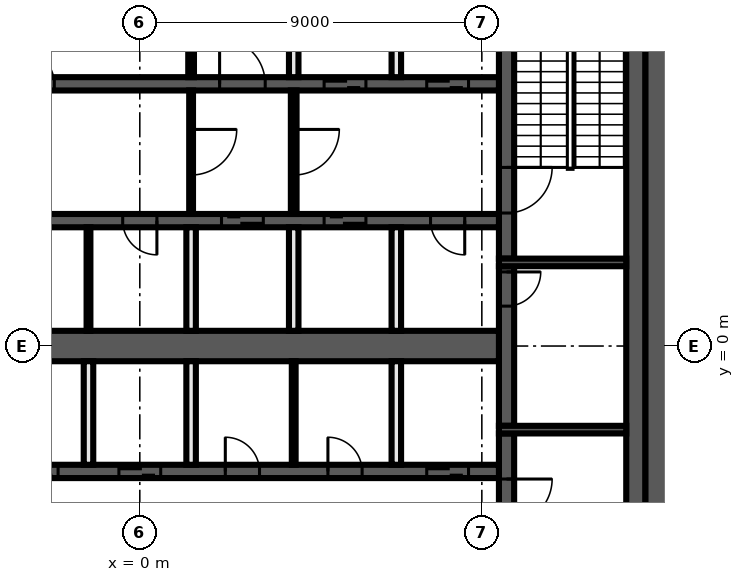
"""IFC4 building model, lengths in metres.
Left out: names, types, materials, properties, quantities, classifications, styles, units other than length and angle.
Written with IfcOpenShell. Run it as: python <this file> out.ifc"""

import sys

from ifc_helpers import new_model, si_unit, direction, frame, frame_2d, origin, place, context, subcontext, project, spatial, rectangle, extrude, element, fill, save


model = new_model("IFC4")
c1 = context("Model", 3, precision=1e-05, world=origin(), true_north=direction((0.0, 1.0)))
c2 = subcontext(c1, "Body", "Model", "MODEL_VIEW")
j1 = project(units=[si_unit("LENGTHUNIT", "METRE"), si_unit("PLANEANGLEUNIT", "RADIAN")], contexts=[c1])
p1 = place(None, origin())
s1 = spatial("IfcSite", under=j1, at=p1, CompositionType="ELEMENT")
p2 = place(p1, origin())
s2 = spatial("IfcBuilding", under=s1, at=p2, CompositionType="ELEMENT")
p3 = place(p2, frame((0.0, 0.0, 258.0)))
s3 = spatial("IfcBuildingStorey", under=s2, at=p3, CompositionType="ELEMENT", Elevation=258.0)
p4 = place(p3, frame((13.65, 10.3, 0.0), z_axis=(0.0, 0.0, 1.0), x_axis=(0.0, -1.0, 0.0)))
e1 = element("IfcWall", 1, at=p4, inside=s3, PredefinedType="SHEAR", context=c2, shape_type="SweptSolid", body=[
    extrude(rectangle(XDim=20.6, YDim=0.7, at=frame_2d((10.3, 0.0))), origin(), (0.0, 0.0, 1.0), 3.82),
])
p5 = place(p3, frame((13.05, 9.8, 0.0), z_axis=(0.0, 0.0, 1.0), x_axis=(0.0, -1.0, 0.0)))
e2 = element("IfcWall", 2, at=p5, inside=s3, PredefinedType="SHEAR", context=c2, shape_type="SweptSolid", body=[
    extrude(rectangle(XDim=19.6, YDim=0.5, at=frame_2d((9.8, 0.0))), origin(), (0.0, 0.0, 1.0), 3.82),
])
p6 = place(p3, frame((9.65, -2.3, 0.0), z_axis=(0.0, 0.0, 1.0), x_axis=(0.0, -1.0, 0.0)))
e3 = element("IfcWall", 3, at=p6, inside=s3, PredefinedType="SHEAR", context=c2, shape_type="SweptSolid", body=[
    extrude(rectangle(XDim=7.5, YDim=0.4, at=frame_2d((3.75, 0.0))), origin(), (0.0, 0.0, 1.0), 3.82),
])
p7 = place(p6, frame((1.2, 0.0, 0.0)))
e4 = element("IfcOpeningElement", 4, at=p7, cuts=e3, PredefinedType="OPENING", context=c2, shape_type="SweptSolid", body=[
    extrude(rectangle(XDim=1.2, YDim=2.1, at=frame_2d((0.6, 1.05))), frame((0.0, 0.21, 0.0), z_axis=(0.0, -1.0, 0.0), x_axis=(1.0, 0.0, 0.0)), (0.0, 0.0, 1.0), 0.42),
])
p8 = place(p3, frame((9.65, 2.1, 0.0), z_axis=(0.0, 0.0, 1.0), x_axis=(0.0, -1.0, 0.0)))
e5 = element("IfcWall", 5, at=p8, inside=s3, PredefinedType="SHEAR", context=c2, shape_type="SweptSolid", body=[
    extrude(rectangle(XDim=4.2, YDim=0.4, at=frame_2d((2.1, 0.0))), origin(), (0.0, 0.0, 1.0), 3.82),
])
p9 = place(p8, frame((0.15, 0.0, 0.0)))
e6 = element("IfcOpeningElement", 6, at=p9, cuts=e5, PredefinedType="OPENING", context=c2, shape_type="SweptSolid", body=[
    extrude(rectangle(XDim=0.9, YDim=2.1, at=frame_2d((0.45, 1.05))), frame((0.0, 0.21, 0.0), z_axis=(0.0, -1.0, 0.0), x_axis=(1.0, 0.0, 0.0)), (0.0, 0.0, 1.0), 0.42),
])
p10 = place(p3, frame((9.65, 9.8, 0.0), z_axis=(0.0, 0.0, 1.0), x_axis=(0.0, -1.0, 0.0)))
e7 = element("IfcWall", 7, at=p10, inside=s3, PredefinedType="SHEAR", context=c2, shape_type="SweptSolid", body=[
    extrude(rectangle(XDim=7.5, YDim=0.4, at=frame_2d((3.75, 0.0))), origin(), (0.0, 0.0, 1.0), 3.82),
])
p11 = place(p10, frame((5.1, 0.0, 0.0)))
e8 = element("IfcOpeningElement", 8, at=p11, cuts=e7, PredefinedType="OPENING", context=c2, shape_type="SweptSolid", body=[
    extrude(rectangle(XDim=1.2, YDim=2.1, at=frame_2d((0.6, 1.05))), frame((0.0, 0.21, 0.0), z_axis=(0.0, -1.0, 0.0), x_axis=(1.0, 0.0, 0.0)), (0.0, 0.0, 1.0), 0.42),
])
for number, where, z_axis, x_axis in (
    (9, (9.45, 2.2, 0.0), (0.0, 0.0, 1.0), (1.0, 0.0, 0.0)),
    (10, (9.45, -2.2, 0.0), (0.0, 0.0, 1.0), (1.0, 0.0, 0.0)),
):
    element("IfcWall", number, at=place(p3, frame(where, z_axis=z_axis, x_axis=x_axis)), inside=s3, PredefinedType="SHEAR", context=c2, shape_type="SweptSolid", body=[
        extrude(rectangle(XDim=3.35, YDim=0.2, at=frame_2d((1.675, 0.0))), origin(), (0.0, 0.0, 1.0), 3.82),
    ])
p12 = place(p3, frame((-9.45, 6.9, 0.0), z_axis=(0.0, 0.0, 1.0), x_axis=(1.0, 0.0, 0.0)))
e11 = element("IfcWall", 11, at=p12, inside=s3, PredefinedType="SHEAR", context=c2, shape_type="SweptSolid", body=[
    extrude(rectangle(XDim=18.9, YDim=0.35, at=frame_2d((9.45, 0.0))), origin(), (0.0, 0.0, 1.0), 3.82),
])
p13 = place(p12, frame((11.55, 0.0, 0.0)))
e12 = element("IfcOpeningElement", 12, at=p13, cuts=e11, PredefinedType="OPENING", context=c2, shape_type="SweptSolid", body=[
    extrude(rectangle(XDim=1.2, YDim=2.1, at=frame_2d((0.6, 1.05))), frame((0.0, 0.185, 0.0), z_axis=(0.0, -1.0, 0.0), x_axis=(1.0, 0.0, 0.0)), (0.0, 0.0, 1.0), 0.37),
])
p14 = place(p12, frame((14.3, 0.0, 0.0)))
e13 = element("IfcOpeningElement", 13, at=p14, cuts=e11, PredefinedType="OPENING", context=c2, shape_type="SweptSolid", body=[
    extrude(rectangle(XDim=1.1, YDim=2.1, at=frame_2d((0.55, 1.05))), frame((0.0, 0.185, 0.0), z_axis=(0.0, -1.0, 0.0), x_axis=(1.0, 0.0, 0.0)), (0.0, 0.0, 1.0), 0.37),
])
p15 = place(p12, frame((17.0, 0.0, 0.0)))
e14 = element("IfcOpeningElement", 14, at=p15, cuts=e11, PredefinedType="OPENING", context=c2, shape_type="SweptSolid", body=[
    extrude(rectangle(XDim=1.1, YDim=2.1, at=frame_2d((0.55, 1.05))), frame((0.0, 0.185, 0.0), z_axis=(0.0, -1.0, 0.0), x_axis=(1.0, 0.0, 0.0)), (0.0, 0.0, 1.0), 0.37),
])
p16 = place(p12, frame((0.9, 0.0, 0.0)))
e15 = element("IfcOpeningElement", 15, at=p16, cuts=e11, PredefinedType="OPENING", context=c2, shape_type="SweptSolid", body=[
    extrude(rectangle(XDim=0.9, YDim=2.1, at=frame_2d((0.45, 1.05))), frame((0.0, 0.185, 0.0), z_axis=(0.0, -1.0, 0.0), x_axis=(1.0, 0.0, 0.0)), (0.0, 0.0, 1.0), 0.37),
])
p17 = place(p12, frame((6.3, 0.0, 0.0)))
e16 = element("IfcOpeningElement", 16, at=p17, cuts=e11, PredefinedType="OPENING", context=c2, shape_type="SweptSolid", body=[
    extrude(rectangle(XDim=0.9, YDim=2.1, at=frame_2d((0.45, 1.05))), frame((0.0, 0.185, 0.0), z_axis=(0.0, -1.0, 0.0), x_axis=(1.0, 0.0, 0.0)), (0.0, 0.0, 1.0), 0.37),
])
p18 = place(p3, frame((9.45, 3.3, 0.0), z_axis=(0.0, 0.0, 1.0), x_axis=(-1.0, 0.0, 0.0)))
e17 = element("IfcWall", 17, at=p18, inside=s3, PredefinedType="SHEAR", context=c2, shape_type="SweptSolid", body=[
    extrude(rectangle(XDim=18.9, YDim=0.35, at=frame_2d((9.45, 0.0))), origin(), (0.0, 0.0, 1.0), 3.82),
])
p19 = place(p18, frame((6.2, 0.0, 0.0)))
e18 = element("IfcOpeningElement", 18, at=p19, cuts=e17, PredefinedType="OPENING", context=c2, shape_type="SweptSolid", body=[
    extrude(rectangle(XDim=1.1, YDim=2.1, at=frame_2d((0.55, 1.05))), frame((0.0, 0.185, 0.0), z_axis=(0.0, -1.0, 0.0), x_axis=(1.0, 0.0, 0.0)), (0.0, 0.0, 1.0), 0.37),
])
p20 = place(p18, frame((3.5, 0.0, 0.0)))
e19 = element("IfcOpeningElement", 19, at=p20, cuts=e17, PredefinedType="OPENING", context=c2, shape_type="SweptSolid", body=[
    extrude(rectangle(XDim=1.1, YDim=2.1, at=frame_2d((0.55, 1.05))), frame((0.0, 0.185, 0.0), z_axis=(0.0, -1.0, 0.0), x_axis=(1.0, 0.0, 0.0)), (0.0, 0.0, 1.0), 0.37),
])
p21 = place(p18, frame((0.9, 0.0, 0.0)))
e20 = element("IfcOpeningElement", 20, at=p21, cuts=e17, PredefinedType="OPENING", context=c2, shape_type="SweptSolid", body=[
    extrude(rectangle(XDim=0.9, YDim=2.1, at=frame_2d((0.45, 1.05))), frame((0.0, 0.185, 0.0), z_axis=(0.0, -1.0, 0.0), x_axis=(1.0, 0.0, 0.0)), (0.0, 0.0, 1.0), 0.37),
])
p22 = place(p18, frame((14.4, 0.0, 0.0)))
e21 = element("IfcOpeningElement", 21, at=p22, cuts=e17, PredefinedType="OPENING", context=c2, shape_type="SweptSolid", body=[
    extrude(rectangle(XDim=0.9, YDim=2.1, at=frame_2d((0.45, 1.05))), frame((0.0, 0.185, 0.0), z_axis=(0.0, -1.0, 0.0), x_axis=(1.0, 0.0, 0.0)), (0.0, 0.0, 1.0), 0.37),
])
p23 = place(p18, frame((9.0, 0.0, 0.0)))
e22 = element("IfcOpeningElement", 22, at=p23, cuts=e17, PredefinedType="OPENING", context=c2, shape_type="SweptSolid", body=[
    extrude(rectangle(XDim=0.9, YDim=2.1, at=frame_2d((0.45, 1.05))), frame((0.0, 0.185, 0.0), z_axis=(0.0, -1.0, 0.0), x_axis=(1.0, 0.0, 0.0)), (0.0, 0.0, 1.0), 0.37),
])
p24 = place(p3, frame((-9.45, -3.3, 0.0), z_axis=(0.0, 0.0, 1.0), x_axis=(1.0, 0.0, 0.0)))
e23 = element("IfcWall", 23, at=p24, inside=s3, PredefinedType="SHEAR", context=c2, shape_type="SweptSolid", body=[
    extrude(rectangle(XDim=18.9, YDim=0.35, at=frame_2d((9.45, 0.0))), origin(), (0.0, 0.0, 1.0), 3.82),
])
p25 = place(p24, frame((0.8, 0.0, 0.0)))
e24 = element("IfcOpeningElement", 24, at=p25, cuts=e23, PredefinedType="OPENING", context=c2, shape_type="SweptSolid", body=[
    extrude(rectangle(XDim=1.1, YDim=2.1, at=frame_2d((0.55, 1.05))), frame((0.0, 0.185, 0.0), z_axis=(0.0, -1.0, 0.0), x_axis=(1.0, 0.0, 0.0)), (0.0, 0.0, 1.0), 0.37),
])
p26 = place(p24, frame((3.5, 0.0, 0.0)))
e25 = element("IfcOpeningElement", 25, at=p26, cuts=e23, PredefinedType="OPENING", context=c2, shape_type="SweptSolid", body=[
    extrude(rectangle(XDim=1.1, YDim=2.1, at=frame_2d((0.55, 1.05))), frame((0.0, 0.185, 0.0), z_axis=(0.0, -1.0, 0.0), x_axis=(1.0, 0.0, 0.0)), (0.0, 0.0, 1.0), 0.37),
])
p27 = place(p24, frame((6.2, 0.0, 0.0)))
e26 = element("IfcOpeningElement", 26, at=p27, cuts=e23, PredefinedType="OPENING", context=c2, shape_type="SweptSolid", body=[
    extrude(rectangle(XDim=1.1, YDim=2.1, at=frame_2d((0.55, 1.05))), frame((0.0, 0.185, 0.0), z_axis=(0.0, -1.0, 0.0), x_axis=(1.0, 0.0, 0.0)), (0.0, 0.0, 1.0), 0.37),
])
p28 = place(p24, frame((8.9, 0.0, 0.0)))
e27 = element("IfcOpeningElement", 27, at=p28, cuts=e23, PredefinedType="OPENING", context=c2, shape_type="SweptSolid", body=[
    extrude(rectangle(XDim=1.1, YDim=2.1, at=frame_2d((0.55, 1.05))), frame((0.0, 0.185, 0.0), z_axis=(0.0, -1.0, 0.0), x_axis=(1.0, 0.0, 0.0)), (0.0, 0.0, 1.0), 0.37),
])
p29 = place(p24, frame((17.0, 0.0, 0.0)))
e28 = element("IfcOpeningElement", 28, at=p29, cuts=e23, PredefinedType="OPENING", context=c2, shape_type="SweptSolid", body=[
    extrude(rectangle(XDim=1.1, YDim=2.1, at=frame_2d((0.55, 1.05))), frame((0.0, 0.185, 0.0), z_axis=(0.0, -1.0, 0.0), x_axis=(1.0, 0.0, 0.0)), (0.0, 0.0, 1.0), 0.37),
])
p30 = place(p24, frame((11.7, 0.0, 0.0)))
e29 = element("IfcOpeningElement", 29, at=p30, cuts=e23, PredefinedType="OPENING", context=c2, shape_type="SweptSolid", body=[
    extrude(rectangle(XDim=0.9, YDim=2.1, at=frame_2d((0.45, 1.05))), frame((0.0, 0.185, 0.0), z_axis=(0.0, -1.0, 0.0), x_axis=(1.0, 0.0, 0.0)), (0.0, 0.0, 1.0), 0.37),
])
p31 = place(p24, frame((14.4, 0.0, 0.0)))
e30 = element("IfcOpeningElement", 30, at=p31, cuts=e23, PredefinedType="OPENING", context=c2, shape_type="SweptSolid", body=[
    extrude(rectangle(XDim=0.9, YDim=2.1, at=frame_2d((0.45, 1.05))), frame((0.0, 0.185, 0.0), z_axis=(0.0, -1.0, 0.0), x_axis=(1.0, 0.0, 0.0)), (0.0, 0.0, 1.0), 0.37),
])
p32 = place(p3, frame((-9.45, 0.0, 0.0), z_axis=(0.0, 0.0, 1.0), x_axis=(1.0, 0.0, 0.0)))
e31 = element("IfcWall", 31, at=p32, inside=s3, PredefinedType="SHEAR", context=c2, shape_type="SweptSolid", body=[
    extrude(rectangle(XDim=18.9, YDim=0.8, at=frame_2d((9.45, 0.0))), origin(), (0.0, 0.0, 1.0), 3.82),
])
for number, where, z_axis, x_axis in (
    (32, (6.75, -3.125, 0.0), (0.0, 0.0, 1.0), (0.0, 1.0, 0.0)),
    (33, (6.75, 0.4, 0.0), (0.0, 0.0, 1.0), (0.0, 1.0, 0.0)),
    (34, (6.75, 7.075, 0.0), (0.0, 0.0, 1.0), (0.0, 1.0, 0.0)),
):
    element("IfcWall", number, at=place(p3, frame(where, z_axis=z_axis, x_axis=x_axis)), inside=s3, PredefinedType="SOLIDWALL", context=c2, shape_type="SweptSolid", body=[
        extrude(rectangle(XDim=2.725, YDim=0.25, at=frame_2d((1.363, 0.0))), origin(), (0.0, 0.0, 1.0), 3.82),
    ])
p33 = place(p3, frame((4.05, 6.725, 0.0), z_axis=(0.0, 0.0, 1.0), x_axis=(0.0, -1.0, 0.0)))
e35 = element("IfcWall", 35, at=p33, inside=s3, PredefinedType="PARTITIONING", context=c2, shape_type="SweptSolid", body=[
    extrude(rectangle(XDim=3.25, YDim=0.15, at=frame_2d((1.625, 0.0))), origin(), (0.0, 0.0, 1.0), 3.82),
])
p34 = place(p33, frame((1.025, 0.0, 0.0)))
e36 = element("IfcOpeningElement", 36, at=p34, cuts=e35, PredefinedType="OPENING", context=c2, shape_type="SweptSolid", body=[
    extrude(rectangle(XDim=1.2, YDim=2.1, at=frame_2d((0.6, 1.05))), frame((0.0, 0.085, 0.0), z_axis=(0.0, -1.0, 0.0), x_axis=(1.0, 0.0, 0.0)), (0.0, 0.0, 1.0), 0.17),
])
p35 = place(p3, frame((4.05, -3.125, 0.0), z_axis=(0.0, 0.0, 1.0), x_axis=(0.0, 1.0, 0.0)))
e37 = element("IfcWall", 37, at=p35, inside=s3, PredefinedType="PARTITIONING", context=c2, shape_type="SweptSolid", body=[
    extrude(rectangle(XDim=2.725, YDim=0.1, at=frame_2d((1.363, 0.0))), origin(), (0.0, 0.0, 1.0), 3.82),
])
for number, where, z_axis, x_axis in (
    (38, (4.05, 0.4, 0.0), (0.0, 0.0, 1.0), (0.0, 1.0, 0.0)),
    (39, (4.05, 7.075, 0.0), (0.0, 0.0, 1.0), (0.0, 1.0, 0.0)),
):
    element("IfcWall", number, at=place(p3, frame(where, z_axis=z_axis, x_axis=x_axis)), inside=s3, PredefinedType="SOLIDWALL", context=c2, shape_type="SweptSolid", body=[
        extrude(rectangle(XDim=2.725, YDim=0.25, at=frame_2d((1.363, 0.0))), origin(), (0.0, 0.0, 1.0), 3.82),
    ])
p36 = place(p3, frame((1.35, 7.075, 0.0), z_axis=(0.0, 0.0, 1.0), x_axis=(0.0, 1.0, 0.0)))
e40 = element("IfcWall", 40, at=p36, inside=s3, PredefinedType="PARTITIONING", context=c2, shape_type="SweptSolid", body=[
    extrude(rectangle(XDim=2.725, YDim=0.15, at=frame_2d((1.363, 0.0))), origin(), (0.0, 0.0, 1.0), 3.82),
])
p37 = place(p3, frame((1.35, 6.725, 0.0), z_axis=(0.0, 0.0, 1.0), x_axis=(0.0, -1.0, 0.0)))
e41 = element("IfcWall", 41, at=p37, inside=s3, PredefinedType="PARTITIONING", context=c2, shape_type="SweptSolid", body=[
    extrude(rectangle(XDim=3.25, YDim=0.1, at=frame_2d((1.625, 0.0))), origin(), (0.0, 0.0, 1.0), 3.82),
])
p38 = place(p37, frame((1.025, 0.0, 0.0)))
e42 = element("IfcOpeningElement", 42, at=p38, cuts=e41, PredefinedType="OPENING", context=c2, shape_type="SweptSolid", body=[
    extrude(rectangle(XDim=1.2, YDim=2.1, at=frame_2d((0.6, 1.05))), frame((0.0, 0.06, 0.0), z_axis=(0.0, -1.0, 0.0), x_axis=(1.0, 0.0, 0.0)), (0.0, 0.0, 1.0), 0.12),
])
for number, where, z_axis, x_axis in (
    (43, (1.35, -3.125, 0.0), (0.0, 0.0, 1.0), (0.0, 1.0, 0.0)),
    (44, (1.35, 0.4, 0.0), (0.0, 0.0, 1.0), (0.0, 1.0, 0.0)),
):
    element("IfcWall", number, at=place(p3, frame(where, z_axis=z_axis, x_axis=x_axis)), inside=s3, PredefinedType="SOLIDWALL", context=c2, shape_type="SweptSolid", body=[
        extrude(rectangle(XDim=2.725, YDim=0.25, at=frame_2d((1.363, 0.0))), origin(), (0.0, 0.0, 1.0), 3.82),
    ])
p39 = place(p3, frame((-1.35, 0.4, 0.0), z_axis=(0.0, 0.0, 1.0), x_axis=(0.0, 1.0, 0.0)))
e45 = element("IfcWall", 45, at=p39, inside=s3, PredefinedType="PARTITIONING", context=c2, shape_type="SweptSolid", body=[
    extrude(rectangle(XDim=2.725, YDim=0.1, at=frame_2d((1.363, 0.0))), origin(), (0.0, 0.0, 1.0), 3.82),
])
p40 = place(p3, frame((-1.35, -3.125, 0.0), z_axis=(0.0, 0.0, 1.0), x_axis=(0.0, 1.0, 0.0)))
e46 = element("IfcWall", 46, at=p40, inside=s3, PredefinedType="SOLIDWALL", context=c2, shape_type="SweptSolid", body=[
    extrude(rectangle(XDim=2.725, YDim=0.25, at=frame_2d((1.363, 0.0))), origin(), (0.0, 0.0, 1.0), 3.82),
])
p41 = place(p9, origin())
e47 = element("IfcDoor", 47, at=p41, inside=s3, OperationType="SINGLE_SWING_RIGHT", PredefinedType="DOOR", context=c2, shape_type="SweptSolid", body=[
    extrude(rectangle(XDim=0.9, YDim=2.1, at=frame_2d((0.45, 1.05))), frame((0.0, 0.025, 0.0), z_axis=(0.0, -1.0, 0.0), x_axis=(1.0, 0.0, 0.0)), (0.0, 0.0, 1.0), 0.05),
])
fill(e6, e47)
p42 = place(p13, origin())
e48 = element("IfcDoor", 48, at=p42, inside=s3, OperationType="SINGLE_SWING_LEFT", PredefinedType="DOOR", context=c2, shape_type="SweptSolid", body=[
    extrude(rectangle(XDim=1.2, YDim=2.1, at=frame_2d((0.6, 1.05))), frame((0.0, 0.025, 0.0), z_axis=(0.0, -1.0, 0.0), x_axis=(1.0, 0.0, 0.0)), (0.0, 0.0, 1.0), 0.05),
])
fill(e12, e48)
p43 = place(p14, origin())
e49 = element("IfcDoor", 49, at=p43, inside=s3, OperationType="DOUBLE_DOOR_SLIDING", PredefinedType="DOOR", context=c2, shape_type="SweptSolid", body=[
    extrude(rectangle(XDim=1.1, YDim=2.1, at=frame_2d((0.55, 1.05))), frame((0.0, 0.025, 0.0), z_axis=(0.0, -1.0, 0.0), x_axis=(1.0, 0.0, 0.0)), (0.0, 0.0, 1.0), 0.05),
])
fill(e13, e49)
p44 = place(p15, origin())
e50 = element("IfcDoor", 50, at=p44, inside=s3, OperationType="DOUBLE_DOOR_SLIDING", PredefinedType="DOOR", context=c2, shape_type="SweptSolid", body=[
    extrude(rectangle(XDim=1.1, YDim=2.1, at=frame_2d((0.55, 1.05))), frame((0.0, 0.025, 0.0), z_axis=(0.0, -1.0, 0.0), x_axis=(1.0, 0.0, 0.0)), (0.0, 0.0, 1.0), 0.05),
])
fill(e14, e50)
p45 = place(p19, origin())
e51 = element("IfcDoor", 51, at=p45, inside=s3, OperationType="DOUBLE_DOOR_SLIDING", PredefinedType="DOOR", context=c2, shape_type="SweptSolid", body=[
    extrude(rectangle(XDim=1.1, YDim=2.1, at=frame_2d((0.55, 1.05))), frame((0.0, 0.025, 0.0), z_axis=(0.0, -1.0, 0.0), x_axis=(1.0, 0.0, 0.0)), (0.0, 0.0, 1.0), 0.05),
])
fill(e18, e51)
p46 = place(p20, origin())
e52 = element("IfcDoor", 52, at=p46, inside=s3, OperationType="DOUBLE_DOOR_SLIDING", PredefinedType="DOOR", context=c2, shape_type="SweptSolid", body=[
    extrude(rectangle(XDim=1.1, YDim=2.1, at=frame_2d((0.55, 1.05))), frame((0.0, 0.025, 0.0), z_axis=(0.0, -1.0, 0.0), x_axis=(1.0, 0.0, 0.0)), (0.0, 0.0, 1.0), 0.05),
])
fill(e19, e52)
p47 = place(p21, origin())
e53 = element("IfcDoor", 53, at=p47, inside=s3, OperationType="SINGLE_SWING_LEFT", PredefinedType="DOOR", context=c2, shape_type="SweptSolid", body=[
    extrude(rectangle(XDim=0.9, YDim=2.1, at=frame_2d((0.45, 1.05))), frame((0.0, 0.025, 0.0), z_axis=(0.0, -1.0, 0.0), x_axis=(1.0, 0.0, 0.0)), (0.0, 0.0, 1.0), 0.05),
])
fill(e20, e53)
p48 = place(p27, origin())
e54 = element("IfcDoor", 54, at=p48, inside=s3, OperationType="DOUBLE_DOOR_SLIDING", PredefinedType="DOOR", context=c2, shape_type="SweptSolid", body=[
    extrude(rectangle(XDim=1.1, YDim=2.1, at=frame_2d((0.55, 1.05))), frame((0.0, 0.025, 0.0), z_axis=(0.0, -1.0, 0.0), x_axis=(1.0, 0.0, 0.0)), (0.0, 0.0, 1.0), 0.05),
])
fill(e26, e54)
p49 = place(p28, origin())
e55 = element("IfcDoor", 55, at=p49, inside=s3, OperationType="DOUBLE_DOOR_SLIDING", PredefinedType="DOOR", context=c2, shape_type="SweptSolid", body=[
    extrude(rectangle(XDim=1.1, YDim=2.1, at=frame_2d((0.55, 1.05))), frame((0.0, 0.025, 0.0), z_axis=(0.0, -1.0, 0.0), x_axis=(1.0, 0.0, 0.0)), (0.0, 0.0, 1.0), 0.05),
])
fill(e27, e55)
p50 = place(p29, origin())
e56 = element("IfcDoor", 56, at=p50, inside=s3, OperationType="DOUBLE_DOOR_SLIDING", PredefinedType="DOOR", context=c2, shape_type="SweptSolid", body=[
    extrude(rectangle(XDim=1.1, YDim=2.1, at=frame_2d((0.55, 1.05))), frame((0.0, 0.025, 0.0), z_axis=(0.0, -1.0, 0.0), x_axis=(1.0, 0.0, 0.0)), (0.0, 0.0, 1.0), 0.05),
])
fill(e28, e56)
p51 = place(p17, origin())
e57 = element("IfcDoor", 57, at=p51, inside=s3, OperationType="SINGLE_SWING_LEFT", PredefinedType="DOOR", context=c2, shape_type="SweptSolid", body=[
    extrude(rectangle(XDim=0.9, YDim=2.1, at=frame_2d((0.45, 1.05))), frame((0.0, 0.025, 0.0), z_axis=(0.0, -1.0, 0.0), x_axis=(1.0, 0.0, 0.0)), (0.0, 0.0, 1.0), 0.05),
])
fill(e16, e57)
p52 = place(p23, origin())
e58 = element("IfcDoor", 58, at=p52, inside=s3, OperationType="SINGLE_SWING_LEFT", PredefinedType="DOOR", context=c2, shape_type="SweptSolid", body=[
    extrude(rectangle(XDim=0.9, YDim=2.1, at=frame_2d((0.45, 1.05))), frame((0.0, 0.025, 0.0), z_axis=(0.0, -1.0, 0.0), x_axis=(1.0, 0.0, 0.0)), (0.0, 0.0, 1.0), 0.05),
])
fill(e22, e58)
p53 = place(p30, origin())
e59 = element("IfcDoor", 59, at=p53, inside=s3, OperationType="SINGLE_SWING_RIGHT", PredefinedType="DOOR", context=c2, shape_type="SweptSolid", body=[
    extrude(rectangle(XDim=0.9, YDim=2.1, at=frame_2d((0.45, 1.05))), frame((0.0, 0.025, 0.0), z_axis=(0.0, -1.0, 0.0), x_axis=(1.0, 0.0, 0.0)), (0.0, 0.0, 1.0), 0.05),
])
fill(e29, e59)
p54 = place(p31, origin())
e60 = element("IfcDoor", 60, at=p54, inside=s3, OperationType="SINGLE_SWING_LEFT", PredefinedType="DOOR", context=c2, shape_type="SweptSolid", body=[
    extrude(rectangle(XDim=0.9, YDim=2.1, at=frame_2d((0.45, 1.05))), frame((0.0, 0.025, 0.0), z_axis=(0.0, -1.0, 0.0), x_axis=(1.0, 0.0, 0.0)), (0.0, 0.0, 1.0), 0.05),
])
fill(e30, e60)
p55 = place(p11, origin())
e61 = element("IfcDoor", 61, at=p55, inside=s3, OperationType="SINGLE_SWING_LEFT", PredefinedType="DOOR", context=c2, shape_type="SweptSolid", body=[
    extrude(rectangle(XDim=1.2, YDim=2.1, at=frame_2d((0.6, 1.05))), frame((0.0, 0.025, 0.0), z_axis=(0.0, -1.0, 0.0), x_axis=(1.0, 0.0, 0.0)), (0.0, 0.0, 1.0), 0.05),
])
fill(e8, e61)
p56 = place(p7, origin())
e62 = element("IfcDoor", 62, at=p56, inside=s3, OperationType="SINGLE_SWING_RIGHT", PredefinedType="DOOR", context=c2, shape_type="SweptSolid", body=[
    extrude(rectangle(XDim=1.2, YDim=2.1, at=frame_2d((0.6, 1.05))), frame((0.0, 0.025, 0.0), z_axis=(0.0, -1.0, 0.0), x_axis=(1.0, 0.0, 0.0)), (0.0, 0.0, 1.0), 0.05),
])
fill(e4, e62)
p57 = place(p38, origin())
e63 = element("IfcDoor", 63, at=p57, inside=s3, OperationType="SINGLE_SWING_LEFT", PredefinedType="DOOR", context=c2, shape_type="SweptSolid", body=[
    extrude(rectangle(XDim=1.2, YDim=2.1, at=frame_2d((0.6, 1.05))), frame((0.0, 0.025, 0.0), z_axis=(0.0, -1.0, 0.0), x_axis=(1.0, 0.0, 0.0)), (0.0, 0.0, 1.0), 0.05),
])
fill(e42, e63)
p58 = place(p34, origin())
e64 = element("IfcDoor", 64, at=p58, inside=s3, OperationType="SINGLE_SWING_RIGHT", PredefinedType="DOOR", context=c2, shape_type="SweptSolid", body=[
    extrude(rectangle(XDim=1.2, YDim=2.1, at=frame_2d((0.6, 1.05))), frame((0.0, 0.025, 0.0), z_axis=(0.0, -1.0, 0.0), x_axis=(1.0, 0.0, 0.0)), (0.0, 0.0, 1.0), 0.05),
])
fill(e36, e64)
save(model, sys.argv[1])
